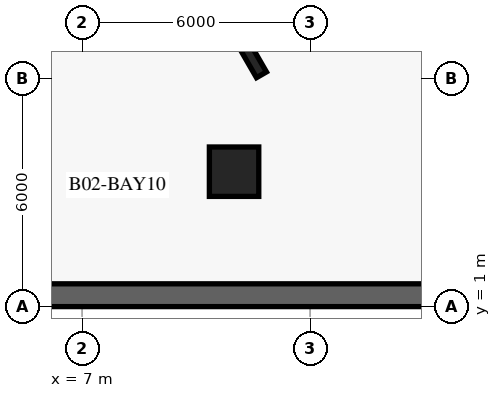
"""IFC4 building model, lengths in metres.
Left out: names, types, materials, properties, quantities, classifications, styles, units other than length and angle.
Written with IfcOpenShell. Run it as: python <this file> out.ifc"""

import sys

from ifc_helpers import new_model, si_unit, direction, frame, frame_2d, origin, origin_2d, place, context, subcontext, project, spatial, rectangle, i_section, extrude, element, save


model = new_model("IFC4")
c1 = context("Model", 3, precision=1e-05, world=origin(), true_north=direction((0.0, 1.0)))
c2 = subcontext(c1, "Body", "Model", "MODEL_VIEW")
j1 = project(units=[si_unit("LENGTHUNIT", "METRE"), si_unit("PLANEANGLEUNIT", "RADIAN")], contexts=[c1])
p1 = place(None, origin())
s1 = spatial("IfcSite", under=j1, at=p1, CompositionType="ELEMENT")
p2 = place(p1, origin())
s2 = spatial("IfcBuilding", under=s1, at=p2, CompositionType="ELEMENT")
p3 = place(p2, frame((0.0, 0.0, -8.4)))
s3 = spatial("IfcBuildingStorey", under=s2, at=p3, CompositionType="ELEMENT", Elevation=-8.4)
p4 = place(p3, frame((1.0, 1.3, 0.0), z_axis=(0.0, 0.0, 1.0), x_axis=(1.0, 0.0, 0.0)))
e1 = element("IfcWall", 1, at=p4, inside=s3, PredefinedType="USERDEFINED", context=c2, shape_type="SweptSolid", body=[
    extrude(rectangle(XDim=74.0, YDim=0.6, at=frame_2d((37.0, 0.0))), origin(), (0.0, 0.0, 1.0), 3.88),
])
p5 = place(p3, frame((11.469, 7.536, 0.0), z_axis=(0.0, 0.0, 1.0), x_axis=(-0.5, 0.866025403784, 0.0)))
e2 = element("IfcColumn", 2, at=p5, inside=s3, PredefinedType="COLUMN", context=c2, shape_type="SweptSolid", body=[
    extrude(i_section(OverallWidth=0.302, OverallDepth=1.008, WebThickness=0.021, FlangeThickness=0.04, at=origin_2d()), origin(), (0.0, 0.0, 1.0), 4.2),
])
p6 = place(p3, frame((11.0, 4.55, 0.0), z_axis=(0.0, 0.0, 1.0), x_axis=(1.0, 0.0, 0.0)))
e3 = element("IfcColumn", 3, at=p6, inside=s3, PredefinedType="COLUMN", context=c2, shape_type="SweptSolid", body=[
    extrude(rectangle(XDim=1.3, YDim=1.3, at=origin_2d()), origin(), (0.0, 0.0, 1.0), 4.2),
])
save(model, sys.argv[1])
